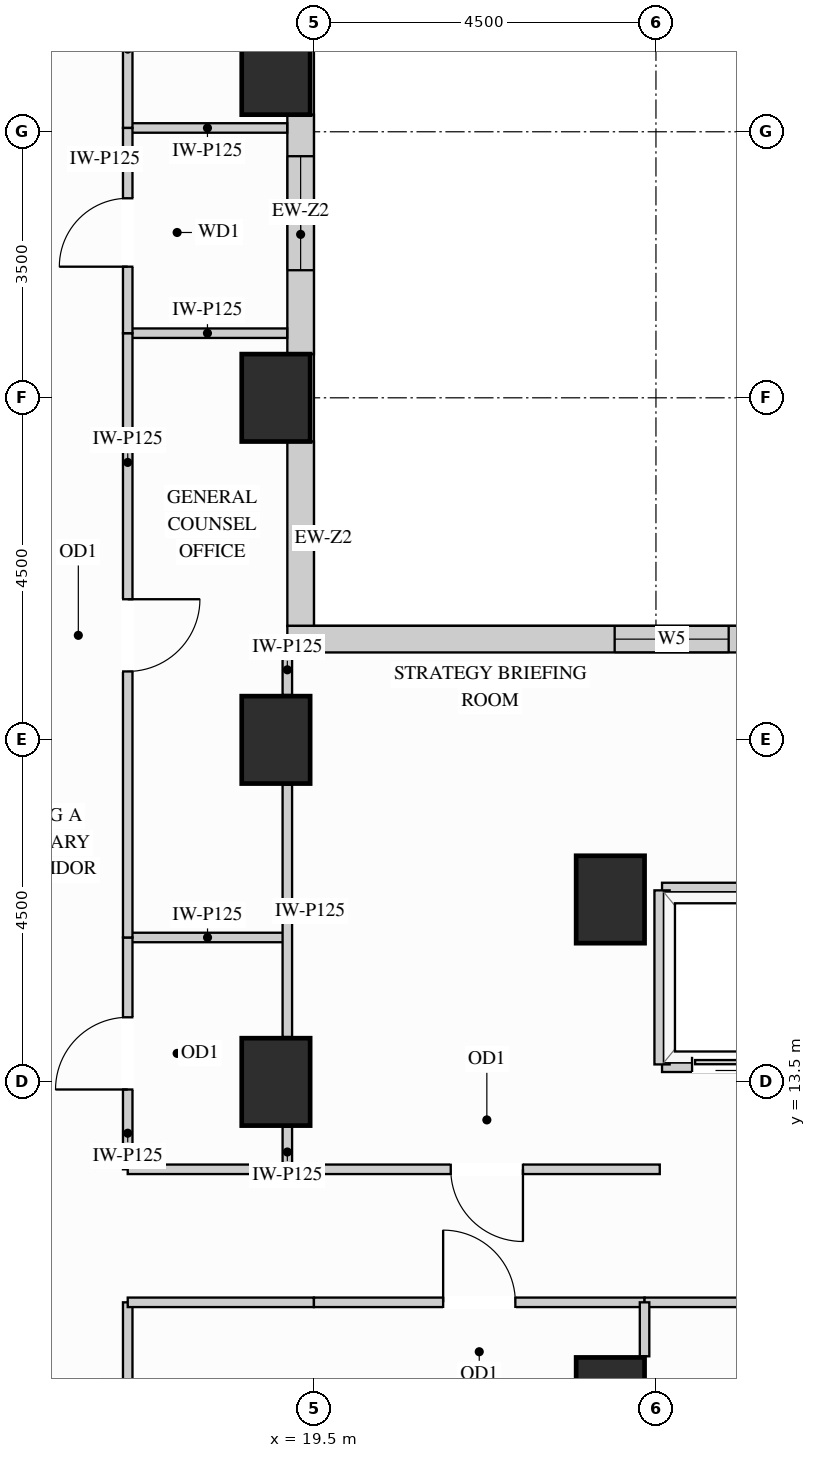
"""IFC4 building model, lengths in metres.
Left out: names, types, materials, properties, quantities, classifications, styles, units other than length and angle.
Written with IfcOpenShell. Run it as: python <this file> out.ifc"""

import sys

from ifc_helpers import new_model, si_unit, direction, frame, frame_2d, origin, origin_2d, place, context, subcontext, project, spatial, rectangle, extrude, source, transform, mapped, element, fill, save


model = new_model("IFC4")
c1 = context("Model", 3, precision=1e-05, world=origin(), true_north=direction((0.0, 1.0)))
c2 = subcontext(c1, "Body", "Model", "MODEL_VIEW")
j1 = project(units=[si_unit("LENGTHUNIT", "METRE"), si_unit("PLANEANGLEUNIT", "RADIAN")], contexts=[c1])
p1 = place(None, origin())
s1 = spatial("IfcSite", under=j1, at=p1, CompositionType="ELEMENT")
p2 = place(p1, origin())
s2 = spatial("IfcBuilding", under=s1, at=p2, CompositionType="ELEMENT")
p3 = place(p2, frame((0.0, 0.0, 113.4)))
s3 = spatial("IfcBuildingStorey", under=s2, at=p3, CompositionType="ELEMENT", Elevation=113.4)
m1 = source(origin(), c2, "Body", "SweptSolid", [
    extrude(rectangle(XDim=0.9, YDim=1.15, at=origin_2d()), origin(), (0.0, 0.0, 1.0), 3.38),
])
for number, where, z_axis, x_axis in (
    (1, (19.0, 13.5, 0.0), (0.0, 0.0, 1.0), (1.0, 0.0, 0.0)),
    (2, (19.0, 18.0, 0.0), (0.0, 0.0, 1.0), (1.0, 0.0, 0.0)),
    (3, (19.0, 22.5, 0.0), (0.0, 0.0, 1.0), (1.0, 0.0, 0.0)),
    (4, (19.0, 26.8, 0.0), (0.0, 0.0, 1.0), (1.0, 0.0, 0.0)),
    (5, (23.4, 15.9, 0.0), (0.0, 0.0, 1.0), (1.0, 0.0, 0.0)),
    (6, (23.4, 9.3, 0.0), (0.0, 0.0, 1.0), (1.0, 0.0, 0.0)),
):
    element("IfcColumn", number, at=place(p3, frame(where, z_axis=z_axis, x_axis=x_axis)), inside=s3, PredefinedType="COLUMN", context=c2, shape_type="MappedRepresentation", body=[
        mapped(m1, transform((0.0, 0.0, 0.0), x_axis=(1.0, 0.0, 0.0), y_axis=(0.0, 1.0, 0.0), z_axis=(0.0, 0.0, 1.0))),
    ])
m2 = source(origin(), c2, "Body", "SweptSolid", [
    extrude(rectangle(XDim=2.429, YDim=0.35, at=frame_2d((1.214, 0.0))), origin(), (0.0, 0.0, 1.0), 2.519),
])
p4 = place(p3, frame((19.325, 19.498, 0.0), z_axis=(0.0, 0.0, 1.0), x_axis=(0.0, 1.0, 0.0)))
e7 = element("IfcWall", 7, at=p4, inside=s3, PredefinedType="SOLIDWALL", context=c2, shape_type="MappedRepresentation", body=[
    mapped(m2, transform((0.0, 0.0, 0.0), x_axis=(1.0, 0.0, 0.0), y_axis=(0.0, 1.0, 0.0), z_axis=(0.0, 0.0, 1.0))),
])
p5 = place(p3, frame((19.325, 23.073, 0.0), z_axis=(0.0, 0.0, 1.0), x_axis=(0.0, 1.0, 0.0)))
e8 = element("IfcWall", 8, at=p5, inside=s3, PredefinedType="SOLIDWALL", context=c2, shape_type="SweptSolid", body=[
    extrude(rectangle(XDim=3.154, YDim=0.35, at=frame_2d((1.577, 0.0))), origin(), (0.0, 0.0, 1.0), 2.519),
])
p6 = place(p5, frame((1.105, 0.0, 0.78)))
e9 = element("IfcOpeningElement", 9, at=p6, cuts=e8, PredefinedType="OPENING", context=c2, shape_type="SweptSolid", body=[
    extrude(rectangle(XDim=1.5, YDim=1.559, at=frame_2d((0.75, 0.78))), frame((0.0, 0.185, 0.0), z_axis=(0.0, -1.0, 0.0), x_axis=(1.0, 0.0, 0.0)), (0.0, 0.0, 1.0), 0.37),
])
p7 = place(p3, frame((34.75, 19.325, 0.0), z_axis=(0.0, 0.0, 1.0), x_axis=(-1.0, 0.0, 0.0)))
e10 = element("IfcWall", 10, at=p7, inside=s3, PredefinedType="SOLIDWALL", context=c2, shape_type="SweptSolid", body=[
    extrude(rectangle(XDim=15.6, YDim=0.35, at=frame_2d((7.8, 0.0))), origin(), (0.0, 0.0, 1.0), 3.365),
])
p8 = place(p7, frame((4.307, 0.0, 0.78)))
e11 = element("IfcOpeningElement", 11, at=p8, cuts=e10, PredefinedType="OPENING", context=c2, shape_type="SweptSolid", body=[
    extrude(rectangle(XDim=1.5, YDim=2.0, at=frame_2d((0.75, 1.0))), frame((0.0, 0.185, 0.0), z_axis=(0.0, -1.0, 0.0), x_axis=(1.0, 0.0, 0.0)), (0.0, 0.0, 1.0), 0.37),
])
p9 = place(p7, frame((9.793, 0.0, 0.78)))
e12 = element("IfcOpeningElement", 12, at=p9, cuts=e10, PredefinedType="OPENING", context=c2, shape_type="SweptSolid", body=[
    extrude(rectangle(XDim=1.5, YDim=2.0, at=frame_2d((0.75, 1.0))), frame((0.0, 0.185, 0.0), z_axis=(0.0, -1.0, 0.0), x_axis=(1.0, 0.0, 0.0)), (0.0, 0.0, 1.0), 0.37),
])
m3 = source(origin(), c2, "Body", "SweptSolid", [
    extrude(rectangle(XDim=2.1, YDim=0.125, at=frame_2d((1.05, 0.0))), origin(), (0.0, 0.0, 1.0), 3.365),
])
p10 = place(p3, frame((17.05, 15.4, 0.0), z_axis=(0.0, 0.0, 1.0), x_axis=(1.0, 0.0, 0.0)))
e13 = element("IfcWall", 13, at=p10, inside=s3, PredefinedType="PARTITIONING", context=c2, shape_type="MappedRepresentation", body=[
    mapped(m3, transform((0.0, 0.0, 0.0), x_axis=(1.0, 0.0, 0.0), y_axis=(0.0, 1.0, 0.0), z_axis=(0.0, 0.0, 1.0))),
])
m4 = source(origin(), c2, "Body", "SweptSolid", [
    extrude(rectangle(XDim=2.098, YDim=0.125, at=frame_2d((1.049, 0.0))), origin(), (0.0, 0.0, 1.0), 3.365),
])
for number, where, z_axis, x_axis in (
    (14, (17.05, 23.35, 0.0), (0.0, 0.0, 1.0), (1.0, 0.0, 0.0)),
    (15, (17.05, 26.05, 0.0), (0.0, 0.0, 1.0), (1.0, 0.0, 0.0)),
):
    element("IfcWall", number, at=place(p3, frame(where, z_axis=z_axis, x_axis=x_axis)), inside=s3, PredefinedType="PARTITIONING", context=c2, shape_type="MappedRepresentation", body=[
        mapped(m4, transform((0.0, 0.0, 0.0), x_axis=(1.0, 0.0, 0.0), y_axis=(0.0, 1.0, 0.0), z_axis=(0.0, 0.0, 1.0))),
    ])
m5 = source(origin(), c2, "Body", "SweptSolid", [
    extrude(rectangle(XDim=0.56, YDim=0.125, at=frame_2d((0.28, 0.0))), origin(), (0.0, 0.0, 1.0), 2.677),
])
p11 = place(p3, frame((19.15, 12.35, 0.0), z_axis=(0.0, 0.0, 1.0), x_axis=(0.0, 1.0, 0.0)))
e16 = element("IfcWall", 16, at=p11, inside=s3, PredefinedType="PARTITIONING", context=c2, shape_type="MappedRepresentation", body=[
    mapped(m5, transform((0.0, 0.0, 0.0), x_axis=(1.0, 0.0, 0.0), y_axis=(0.0, 1.0, 0.0), z_axis=(0.0, 0.0, 1.0))),
])
m6 = source(origin(), c2, "Body", "SweptSolid", [
    extrude(rectangle(XDim=3.32, YDim=0.125, at=frame_2d((1.66, 0.0))), origin(), (0.0, 0.0, 1.0), 2.677),
])
p12 = place(p3, frame((19.15, 14.09, 0.0), z_axis=(0.0, 0.0, 1.0), x_axis=(0.0, 1.0, 0.0)))
e17 = element("IfcWall", 17, at=p12, inside=s3, PredefinedType="PARTITIONING", context=c2, shape_type="MappedRepresentation", body=[
    mapped(m6, transform((0.0, 0.0, 0.0), x_axis=(1.0, 0.0, 0.0), y_axis=(0.0, 1.0, 0.0), z_axis=(0.0, 0.0, 1.0))),
])
m7 = source(origin(), c2, "Body", "SweptSolid", [
    extrude(rectangle(XDim=0.558, YDim=0.125, at=frame_2d((0.279, 0.0))), origin(), (0.0, 0.0, 1.0), 2.519),
])
p13 = place(p3, frame((19.15, 18.59, 0.0), z_axis=(0.0, 0.0, 1.0), x_axis=(0.0, 1.0, 0.0)))
e18 = element("IfcWall", 18, at=p13, inside=s3, PredefinedType="PARTITIONING", context=c2, shape_type="MappedRepresentation", body=[
    mapped(m7, transform((0.0, 0.0, 0.0), x_axis=(1.0, 0.0, 0.0), y_axis=(0.0, 1.0, 0.0), z_axis=(0.0, 0.0, 1.0))),
])
p14 = place(p3, frame((17.05, 12.35, 0.0), z_axis=(0.0, 0.0, 1.0), x_axis=(0.0, 1.0, 0.0)))
e19 = element("IfcWall", 19, at=p14, inside=s3, PredefinedType="PARTITIONING", context=c2, shape_type="SweptSolid", body=[
    extrude(rectangle(XDim=3.05, YDim=0.125, at=frame_2d((1.525, 0.0))), origin(), (0.0, 0.0, 1.0), 3.365),
])
p15 = place(p14, frame((1.05, 0.0, 0.0)))
e20 = element("IfcOpeningElement", 20, at=p15, cuts=e19, PredefinedType="OPENING", context=c2, shape_type="SweptSolid", body=[
    extrude(rectangle(XDim=0.95, YDim=2.15, at=frame_2d((0.475, 1.075))), frame((0.0, 0.073, 0.0), z_axis=(0.0, -1.0, 0.0), x_axis=(1.0, 0.0, 0.0)), (0.0, 0.0, 1.0), 0.145),
])
p16 = place(p3, frame((17.05, 15.4, 0.0), z_axis=(0.0, 0.0, 1.0), x_axis=(0.0, 1.0, 0.0)))
e21 = element("IfcWall", 21, at=p16, inside=s3, PredefinedType="PARTITIONING", context=c2, shape_type="SweptSolid", body=[
    extrude(rectangle(XDim=7.95, YDim=0.125, at=frame_2d((3.975, 0.0))), origin(), (0.0, 0.0, 1.0), 3.365),
])
p17 = place(p16, frame((3.5, 0.0, 0.0)))
e22 = element("IfcOpeningElement", 22, at=p17, cuts=e21, PredefinedType="OPENING", context=c2, shape_type="SweptSolid", body=[
    extrude(rectangle(XDim=0.95, YDim=2.15, at=frame_2d((0.475, 1.075))), frame((0.0, 0.073, 0.0), z_axis=(0.0, -1.0, 0.0), x_axis=(1.0, 0.0, 0.0)), (0.0, 0.0, 1.0), 0.145),
])
p18 = place(p3, frame((17.05, 26.05, 0.0), z_axis=(0.0, 0.0, 1.0), x_axis=(0.0, 1.0, 0.0)))
e23 = element("IfcWall", 23, at=p18, inside=s3, PredefinedType="PARTITIONING", context=c2, shape_type="SweptSolid", body=[
    extrude(rectangle(XDim=5.3, YDim=0.125, at=frame_2d((2.65, 0.0))), origin(), (0.0, 0.0, 1.0), 3.365),
])
p19 = place(p18, frame((2.175, 0.0, 0.0)))
e24 = element("IfcOpeningElement", 24, at=p19, cuts=e23, PredefinedType="OPENING", context=c2, shape_type="SweptSolid", body=[
    extrude(rectangle(XDim=0.95, YDim=2.15, at=frame_2d((0.475, 1.075))), frame((0.0, 0.073, 0.0), z_axis=(0.0, -1.0, 0.0), x_axis=(1.0, 0.0, 0.0)), (0.0, 0.0, 1.0), 0.145),
])
p20 = place(p3, frame((17.05, 6.1, 0.0), z_axis=(0.0, 0.0, 1.0), x_axis=(0.0, 1.0, 0.0)))
e25 = element("IfcWall", 25, at=p20, inside=s3, PredefinedType="PARTITIONING", context=c2, shape_type="SweptSolid", body=[
    extrude(rectangle(XDim=4.5, YDim=0.125, at=frame_2d((2.25, 0.0))), origin(), (0.0, 0.0, 1.0), 3.365),
])
p21 = place(p20, frame((1.775, 0.0, 0.0)))
e26 = element("IfcOpeningElement", 26, at=p21, cuts=e25, PredefinedType="OPENING", context=c2, shape_type="SweptSolid", body=[
    extrude(rectangle(XDim=0.95, YDim=2.15, at=frame_2d((0.475, 1.075))), frame((0.0, 0.073, 0.0), z_axis=(0.0, -1.0, 0.0), x_axis=(1.0, 0.0, 0.0)), (0.0, 0.0, 1.0), 0.145),
])
p22 = place(p3, frame((17.05, 23.35, 0.0), z_axis=(0.0, 0.0, 1.0), x_axis=(0.0, 1.0, 0.0)))
e27 = element("IfcWall", 27, at=p22, inside=s3, PredefinedType="PARTITIONING", context=c2, shape_type="SweptSolid", body=[
    extrude(rectangle(XDim=2.7, YDim=0.125, at=frame_2d((1.35, 0.0))), origin(), (0.0, 0.0, 1.0), 3.365),
])
p23 = place(p22, frame((0.875, 0.0, 0.0)))
e28 = element("IfcOpeningElement", 28, at=p23, cuts=e27, PredefinedType="OPENING", context=c2, shape_type="SweptSolid", body=[
    extrude(rectangle(XDim=0.9, YDim=2.15, at=frame_2d((0.45, 1.075))), frame((0.0, 0.073, 0.0), z_axis=(0.0, -1.0, 0.0), x_axis=(1.0, 0.0, 0.0)), (0.0, 0.0, 1.0), 0.145),
])
m8 = source(origin(), c2, "Body", "SweptSolid", [
    extrude(rectangle(XDim=2.45, YDim=0.125, at=frame_2d((1.225, 0.0))), origin(), (0.0, 0.0, 1.0), 3.365),
])
p24 = place(p3, frame((17.05, 12.35, 0.0), z_axis=(0.0, 0.0, 1.0), x_axis=(1.0, 0.0, 0.0)))
e29 = element("IfcWall", 29, at=p24, inside=s3, PredefinedType="PARTITIONING", context=c2, shape_type="MappedRepresentation", body=[
    mapped(m8, transform((0.0, 0.0, 0.0), x_axis=(1.0, 0.0, 0.0), y_axis=(0.0, 1.0, 0.0), z_axis=(0.0, 0.0, 1.0))),
])
p25 = place(p3, frame((19.5, 12.35, 0.0), z_axis=(0.0, 0.0, 1.0), x_axis=(1.0, 0.0, 0.0)))
e30 = element("IfcWall", 30, at=p25, inside=s3, PredefinedType="PARTITIONING", context=c2, shape_type="SweptSolid", body=[
    extrude(rectangle(XDim=4.55, YDim=0.125, at=frame_2d((2.275, 0.0))), origin(), (0.0, 0.0, 1.0), 3.365),
])
p26 = place(p25, frame((1.8, 0.0, 0.0)))
e31 = element("IfcOpeningElement", 31, at=p26, cuts=e30, PredefinedType="OPENING", context=c2, shape_type="SweptSolid", body=[
    extrude(rectangle(XDim=0.95, YDim=2.15, at=frame_2d((0.475, 1.075))), frame((0.0, 0.073, 0.0), z_axis=(0.0, -1.0, 0.0), x_axis=(1.0, 0.0, 0.0)), (0.0, 0.0, 1.0), 0.145),
])
p27 = place(p3, frame((17.05, 10.6, 0.0), z_axis=(0.0, 0.0, 1.0), x_axis=(1.0, 0.0, 0.0)))
e32 = element("IfcWall", 32, at=p27, inside=s3, PredefinedType="PARTITIONING", context=c2, shape_type="MappedRepresentation", body=[
    mapped(m8, transform((0.0, 0.0, 0.0), x_axis=(1.0, 0.0, 0.0), y_axis=(0.0, 1.0, 0.0), z_axis=(0.0, 0.0, 1.0))),
])
p28 = place(p3, frame((19.5, 10.6, 0.0), z_axis=(0.0, 0.0, 1.0), x_axis=(1.0, 0.0, 0.0)))
e33 = element("IfcWall", 33, at=p28, inside=s3, PredefinedType="PARTITIONING", context=c2, shape_type="SweptSolid", body=[
    extrude(rectangle(XDim=4.35, YDim=0.125, at=frame_2d((2.175, 0.0))), origin(), (0.0, 0.0, 1.0), 3.365),
])
p29 = place(p28, frame((1.7, 0.0, 0.0)))
e34 = element("IfcOpeningElement", 34, at=p29, cuts=e33, PredefinedType="OPENING", context=c2, shape_type="SweptSolid", body=[
    extrude(rectangle(XDim=0.95, YDim=2.15, at=frame_2d((0.475, 1.075))), frame((0.0, 0.073, 0.0), z_axis=(0.0, -1.0, 0.0), x_axis=(1.0, 0.0, 0.0)), (0.0, 0.0, 1.0), 0.145),
])
p30 = place(p3, frame((23.85, 10.6, 0.0), z_axis=(0.0, 0.0, 1.0), x_axis=(1.0, 0.0, 0.0)))
e35 = element("IfcWall", 35, at=p30, inside=s3, PredefinedType="PARTITIONING", context=c2, shape_type="SweptSolid", body=[
    extrude(rectangle(XDim=6.0, YDim=0.125, at=frame_2d((3.0, 0.0))), origin(), (0.0, 0.0, 1.0), 3.365),
])
p31 = place(p30, frame((2.525, 0.0, 0.0)))
e36 = element("IfcOpeningElement", 36, at=p31, cuts=e35, PredefinedType="OPENING", context=c2, shape_type="SweptSolid", body=[
    extrude(rectangle(XDim=0.95, YDim=2.15, at=frame_2d((0.475, 1.075))), frame((0.0, 0.073, 0.0), z_axis=(0.0, -1.0, 0.0), x_axis=(1.0, 0.0, 0.0)), (0.0, 0.0, 1.0), 0.145),
])
m9 = source(origin(), c2, "Body", "SweptSolid", [
    extrude(rectangle(XDim=0.71, YDim=0.125, at=frame_2d((0.355, 0.0))), origin(), (0.0, 0.0, 1.0), 3.365),
])
p32 = place(p3, frame((23.85, 9.89, 0.0), z_axis=(0.0, 0.0, 1.0), x_axis=(0.0, 1.0, 0.0)))
e37 = element("IfcWall", 37, at=p32, inside=s3, PredefinedType="PARTITIONING", context=c2, shape_type="MappedRepresentation", body=[
    mapped(m9, transform((0.0, 0.0, 0.0), x_axis=(1.0, 0.0, 0.0), y_axis=(0.0, 1.0, 0.0), z_axis=(0.0, 0.0, 1.0))),
])
m10 = source(origin(), c2, "Body", "SweptSolid", [
    extrude(rectangle(XDim=1.89, YDim=0.2, at=frame_2d((0.945, 0.0))), origin(), (0.0, 0.0, 1.0), 2.677),
])
p33 = place(p3, frame((24.08, 16.02, 0.0), z_axis=(0.0, 0.0, 1.0), x_axis=(1.0, 0.0, 0.0)))
e38 = element("IfcWall", 38, at=p33, inside=s3, PredefinedType="PARTITIONING", context=c2, shape_type="MappedRepresentation", body=[
    mapped(m10, transform((0.0, 0.0, 0.0), x_axis=(1.0, 0.0, 0.0), y_axis=(0.0, 1.0, 0.0), z_axis=(0.0, 0.0, 1.0))),
])
p34 = place(p3, frame((24.08, 13.73, 0.0), z_axis=(0.0, 0.0, 1.0), x_axis=(1.0, 0.0, 0.0)))
e39 = element("IfcWall", 39, at=p34, inside=s3, PredefinedType="PARTITIONING", context=c2, shape_type="SweptSolid", body=[
    extrude(rectangle(XDim=1.89, YDim=0.2, at=frame_2d((0.945, 0.0))), origin(), (0.0, 0.0, 1.0), 2.446),
])
p35 = place(p34, frame((0.395, 0.0, 0.0)))
e40 = element("IfcOpeningElement", 40, at=p35, cuts=e39, PredefinedType="OPENING", context=c2, shape_type="SweptSolid", body=[
    extrude(rectangle(XDim=1.1, YDim=2.2, at=frame_2d((0.55, 1.1))), frame((0.0, 0.11, 0.0), z_axis=(0.0, -1.0, 0.0), x_axis=(1.0, 0.0, 0.0)), (0.0, 0.0, 1.0), 0.22),
])
m11 = source(origin(), c2, "Body", "SweptSolid", [
    extrude(rectangle(XDim=2.29, YDim=0.2, at=frame_2d((1.145, 0.0))), origin(), (0.0, 0.0, 1.0), 3.365),
])
p36 = place(p3, frame((24.08, 13.73, 0.0), z_axis=(0.0, 0.0, 1.0), x_axis=(0.0, 1.0, 0.0)))
e41 = element("IfcWall", 41, at=p36, inside=s3, PredefinedType="PARTITIONING", context=c2, shape_type="MappedRepresentation", body=[
    mapped(m11, transform((0.0, 0.0, 0.0), x_axis=(1.0, 0.0, 0.0), y_axis=(0.0, 1.0, 0.0), z_axis=(0.0, 0.0, 1.0))),
])
m12 = source(origin(), c2, "Body", "SweptSolid", [
    extrude(rectangle(XDim=1.1, YDim=2.2, at=frame_2d((0.55, 1.1))), frame((0.0, 0.025, 0.0), z_axis=(0.0, -1.0, 0.0), x_axis=(1.0, 0.0, 0.0)), (0.0, 0.0, 1.0), 0.05),
])
p37 = place(p35, origin())
e42 = element("IfcDoor", 42, at=p37, inside=s3, OperationType="SLIDING_TO_LEFT", PredefinedType="DOOR", context=c2, shape_type="MappedRepresentation", body=[
    mapped(m12, transform((0.0, 0.0, 0.0), x_axis=(1.0, 0.0, 0.0), y_axis=(0.0, 1.0, 0.0), z_axis=(0.0, 0.0, 1.0))),
])
fill(e40, e42)
m13 = source(origin(), c2, "Body", "SweptSolid", [
    extrude(rectangle(XDim=0.95, YDim=2.15, at=frame_2d((0.475, 1.075))), frame((0.0, 0.025, 0.0), z_axis=(0.0, -1.0, 0.0), x_axis=(1.0, 0.0, 0.0)), (0.0, 0.0, 1.0), 0.05),
])
p38 = place(p15, origin())
e43 = element("IfcDoor", 43, at=p38, inside=s3, OperationType="SINGLE_SWING_LEFT", PredefinedType="DOOR", context=c2, shape_type="MappedRepresentation", body=[
    mapped(m13, transform((0.0, 0.0, 0.0), x_axis=(1.0, 0.0, 0.0), y_axis=(0.0, 1.0, 0.0), z_axis=(0.0, 0.0, 1.0))),
])
fill(e20, e43)
p39 = place(p17, origin())
e44 = element("IfcDoor", 44, at=p39, inside=s3, OperationType="SINGLE_SWING_RIGHT", PredefinedType="DOOR", context=c2, shape_type="MappedRepresentation", body=[
    mapped(m13, transform((0.0, 0.0, 0.0), x_axis=(1.0, 0.0, 0.0), y_axis=(0.0, 1.0, 0.0), z_axis=(0.0, 0.0, 1.0))),
])
fill(e22, e44)
p40 = place(p26, origin())
e45 = element("IfcDoor", 45, at=p40, inside=s3, OperationType="SINGLE_SWING_RIGHT", PredefinedType="DOOR", context=c2, shape_type="MappedRepresentation", body=[
    mapped(m13, transform((0.0, 0.0, 0.0), x_axis=(1.0, 0.0, 0.0), y_axis=(0.0, 1.0, 0.0), z_axis=(0.0, 0.0, 1.0))),
])
fill(e31, e45)
p41 = place(p29, origin())
e46 = element("IfcDoor", 46, at=p41, inside=s3, OperationType="SINGLE_SWING_LEFT", PredefinedType="DOOR", context=c2, shape_type="MappedRepresentation", body=[
    mapped(m13, transform((0.0, 0.0, 0.0), x_axis=(1.0, 0.0, 0.0), y_axis=(0.0, 1.0, 0.0), z_axis=(0.0, 0.0, 1.0))),
])
fill(e34, e46)
m14 = source(origin(), c2, "Body", "SweptSolid", [
    extrude(rectangle(XDim=0.9, YDim=2.15, at=frame_2d((0.45, 1.075))), frame((0.0, 0.025, 0.0), z_axis=(0.0, -1.0, 0.0), x_axis=(1.0, 0.0, 0.0)), (0.0, 0.0, 1.0), 0.05),
])
p42 = place(p23, origin())
e47 = element("IfcDoor", 47, at=p42, inside=s3, OperationType="SINGLE_SWING_LEFT", PredefinedType="DOOR", context=c2, shape_type="MappedRepresentation", body=[
    mapped(m14, transform((0.0, 0.0, 0.0), x_axis=(1.0, 0.0, 0.0), y_axis=(0.0, 1.0, 0.0), z_axis=(0.0, 0.0, 1.0))),
])
fill(e28, e47)
m15 = source(origin(), c2, "Body", "SweptSolid", [
    extrude(rectangle(XDim=1.5, YDim=1.559, at=frame_2d((0.75, 0.78))), frame((0.0, 0.03, 0.0), z_axis=(0.0, -1.0, 0.0), x_axis=(1.0, 0.0, 0.0)), (0.0, 0.0, 1.0), 0.06),
])
p43 = place(p6, origin())
e48 = element("IfcWindow", 48, at=p43, inside=s3, PartitioningType="SINGLE_PANEL", PredefinedType="WINDOW", context=c2, shape_type="MappedRepresentation", body=[
    mapped(m15, transform((0.0, 0.0, 0.0), x_axis=(1.0, 0.0, 0.0), y_axis=(0.0, 1.0, 0.0), z_axis=(0.0, 0.0, 1.0))),
])
fill(e9, e48)
m16 = source(origin(), c2, "Body", "SweptSolid", [
    extrude(rectangle(XDim=1.5, YDim=2.0, at=frame_2d((0.75, 1.0))), frame((0.0, 0.03, 0.0), z_axis=(0.0, -1.0, 0.0), x_axis=(1.0, 0.0, 0.0)), (0.0, 0.0, 1.0), 0.06),
])
p44 = place(p9, origin())
e49 = element("IfcWindow", 49, at=p44, inside=s3, PartitioningType="SINGLE_PANEL", PredefinedType="WINDOW", context=c2, shape_type="MappedRepresentation", body=[
    mapped(m16, transform((0.0, 0.0, 0.0), x_axis=(1.0, 0.0, 0.0), y_axis=(0.0, 1.0, 0.0), z_axis=(0.0, 0.0, 1.0))),
])
fill(e12, e49)
save(model, sys.argv[1])
